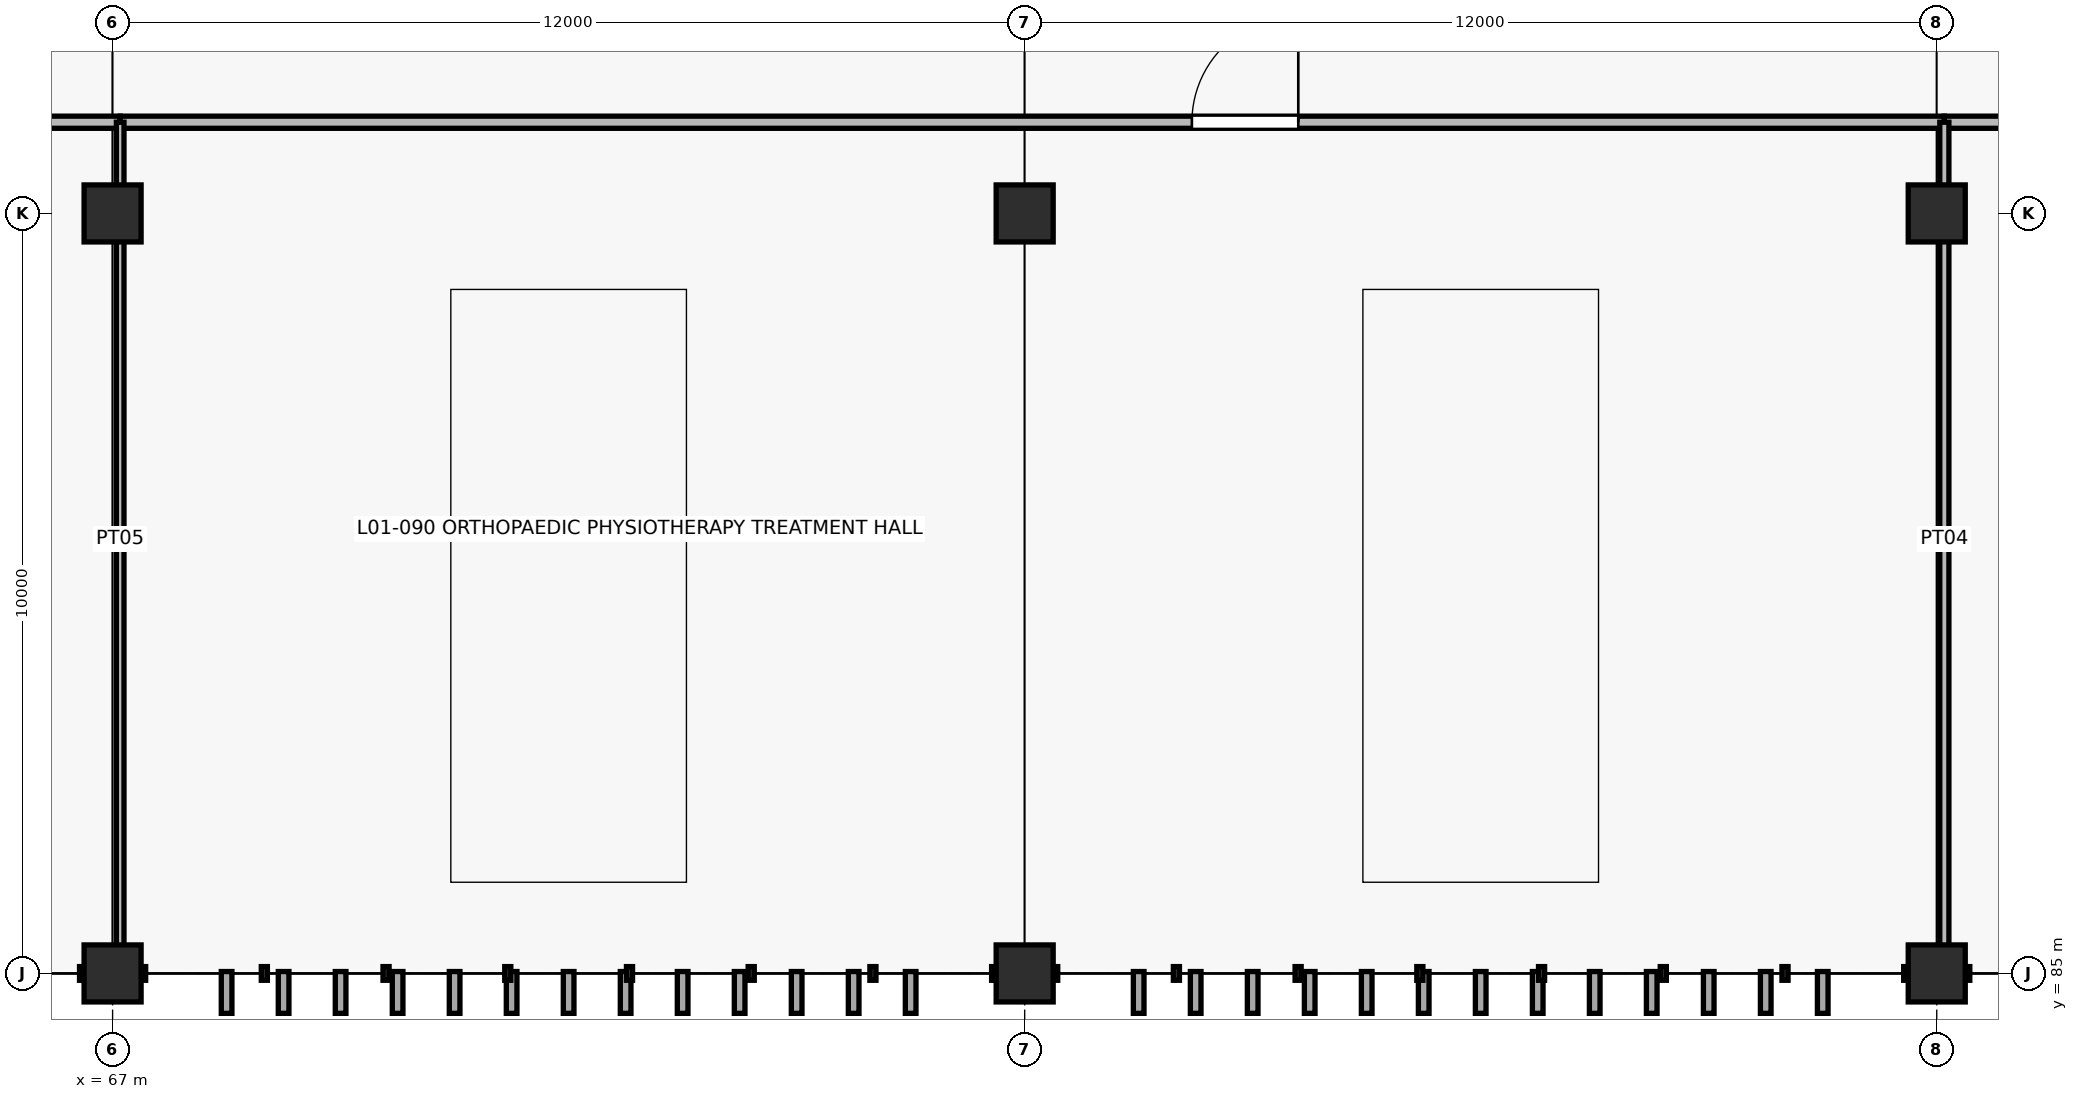
"""IFC4 building model, lengths in metres.
Left out: names, types, materials, properties, quantities, classifications, styles, units other than length and angle.
Written with IfcOpenShell. Run it as: python <this file> out.ifc"""

import sys

from ifc_helpers import new_model, si_unit, direction, frame, frame_2d, origin, origin_2d, place, context, subcontext, project, spatial, rectangle, extrude, element, fill, save


model = new_model("IFC4")
c1 = context("Model", 3, precision=1e-05, world=origin(), true_north=direction((0.0, 1.0)))
c2 = subcontext(c1, "Body", "Model", "MODEL_VIEW")
j1 = project(units=[si_unit("LENGTHUNIT", "METRE"), si_unit("PLANEANGLEUNIT", "RADIAN")], contexts=[c1])
p1 = place(None, origin())
s1 = spatial("IfcSite", under=j1, at=p1, CompositionType="ELEMENT")
p2 = place(p1, origin())
s2 = spatial("IfcBuilding", under=s1, at=p2, CompositionType="ELEMENT")
p3 = place(p2, frame((0.0, 0.0, 4.8)))
s3 = spatial("IfcBuildingStorey", under=s2, at=p3, CompositionType="ELEMENT", Elevation=4.8)
for number, where, z_axis, x_axis in (
    (1, (67.0, 85.0, 0.0), (0.0, 0.0, 1.0), (1.0, 0.0, 0.0)),
    (2, (67.0, 95.0, 0.0), (0.0, 0.0, 1.0), (1.0, 0.0, 0.0)),
    (3, (79.0, 85.0, 0.0), (0.0, 0.0, 1.0), (1.0, 0.0, 0.0)),
    (4, (79.0, 95.0, 0.0), (0.0, 0.0, 1.0), (1.0, 0.0, 0.0)),
    (5, (91.0, 85.0, 0.0), (0.0, 0.0, 1.0), (1.0, 0.0, 0.0)),
    (6, (91.0, 95.0, 0.0), (0.0, 0.0, 1.0), (1.0, 0.0, 0.0)),
):
    element("IfcColumn", number, at=place(p3, frame(where, z_axis=z_axis, x_axis=x_axis)), inside=s3, PredefinedType="COLUMN", context=c2, shape_type="SweptSolid", body=[
        extrude(rectangle(XDim=0.75, YDim=0.75, at=origin_2d()), origin(), (0.0, 0.0, 1.0), 4.2),
    ])
p4 = place(p3, frame((43.18, 96.2, 0.0), z_axis=(0.0, 0.0, 1.0), x_axis=(1.0, 0.0, 0.0)))
e7 = element("IfcWall", 7, at=p4, inside=s3, PredefinedType="PARTITIONING", context=c2, shape_type="SweptSolid", body=[
    extrude(rectangle(XDim=23.92, YDim=0.16, at=frame_2d((11.96, 0.0))), origin(), (0.0, 0.0, 1.0), 2.925),
])
p5 = place(p4, frame((14.185, 0.0, 0.0)))
e8 = element("IfcOpeningElement", 8, at=p5, cuts=e7, PredefinedType="OPENING", context=c2, shape_type="SweptSolid", body=[
    extrude(rectangle(XDim=1.15, YDim=2.15, at=frame_2d((0.575, 1.075))), frame((0.0, 0.09, 0.0), z_axis=(0.0, -1.0, 0.0), x_axis=(1.0, 0.0, 0.0)), (0.0, 0.0, 1.0), 0.18),
])
p6 = place(p3, frame((67.1, 96.2, 0.0), z_axis=(0.0, 0.0, 1.0), x_axis=(1.0, 0.0, 0.0)))
e9 = element("IfcWall", 9, at=p6, inside=s3, PredefinedType="PARTITIONING", context=c2, shape_type="SweptSolid", body=[
    extrude(rectangle(XDim=24.0, YDim=0.16, at=frame_2d((12.0, 0.0))), origin(), (0.0, 0.0, 1.0), 2.925),
])
p7 = place(p6, frame((14.1, 0.0, 0.0)))
e10 = element("IfcOpeningElement", 10, at=p7, cuts=e9, PredefinedType="OPENING", context=c2, shape_type="SweptSolid", body=[
    extrude(rectangle(XDim=1.4, YDim=2.2, at=frame_2d((0.7, 1.1))), frame((0.0, 0.09, 0.0), z_axis=(0.0, -1.0, 0.0), x_axis=(1.0, 0.0, 0.0)), (0.0, 0.0, 1.0), 0.18),
])
p8 = place(p3, frame((67.1, 85.22, 0.0), z_axis=(0.0, 0.0, 1.0), x_axis=(0.0, 1.0, 0.0)))
e11 = element("IfcWall", 11, at=p8, inside=s3, PredefinedType="PARTITIONING", context=c2, shape_type="SweptSolid", body=[
    extrude(rectangle(XDim=10.98, YDim=0.1, at=frame_2d((5.49, 0.0))), origin(), (0.0, 0.0, 1.0), 2.925),
])
p9 = place(p3, frame((91.1, 96.2, 0.0), z_axis=(0.0, 0.0, 1.0), x_axis=(1.0, 0.0, 0.0)))
e12 = element("IfcWall", 12, at=p9, inside=s3, PredefinedType="PARTITIONING", context=c2, shape_type="SweptSolid", body=[
    extrude(rectangle(XDim=20.0, YDim=0.16, at=frame_2d((10.0, 0.0))), origin(), (0.0, 0.0, 1.0), 2.925),
])
p10 = place(p9, frame((12.05, 0.0, 0.0)))
e13 = element("IfcOpeningElement", 13, at=p10, cuts=e12, PredefinedType="OPENING", context=c2, shape_type="SweptSolid", body=[
    extrude(rectangle(XDim=1.5, YDim=2.2, at=frame_2d((0.75, 1.1))), frame((0.0, 0.09, 0.0), z_axis=(0.0, -1.0, 0.0), x_axis=(1.0, 0.0, 0.0)), (0.0, 0.0, 1.0), 0.18),
])
p11 = place(p3, frame((91.1, 85.22, 0.0), z_axis=(0.0, 0.0, 1.0), x_axis=(0.0, 1.0, 0.0)))
e14 = element("IfcWall", 14, at=p11, inside=s3, PredefinedType="PARTITIONING", context=c2, shape_type="SweptSolid", body=[
    extrude(rectangle(XDim=10.98, YDim=0.12, at=frame_2d((5.49, 0.0))), origin(), (0.0, 0.0, 1.0), 2.925),
])
p12 = place(p7, origin())
e15 = element("IfcDoor", 15, at=p12, inside=s3, OperationType="SINGLE_SWING_RIGHT", PredefinedType="DOOR", context=c2, shape_type="SweptSolid", body=[
    extrude(rectangle(XDim=1.4, YDim=2.2, at=frame_2d((0.7, 1.1))), frame((0.0, 0.025, 0.0), z_axis=(0.0, -1.0, 0.0), x_axis=(1.0, 0.0, 0.0)), (0.0, 0.0, 1.0), 0.05),
])
fill(e10, e15)
save(model, sys.argv[1])
